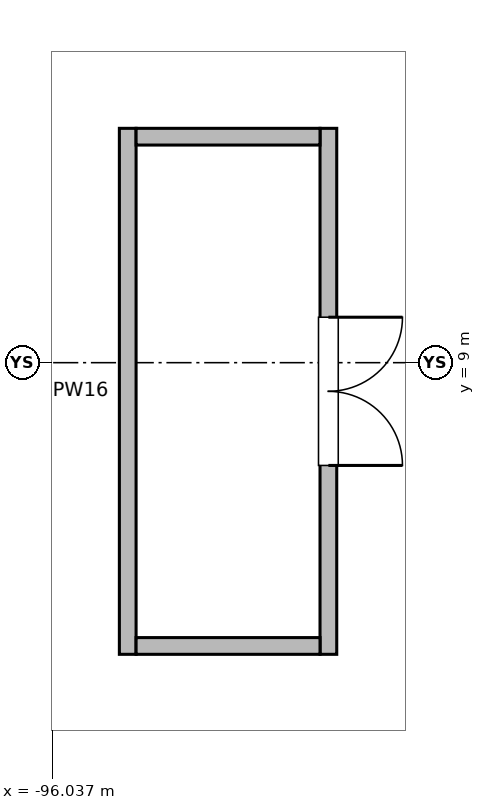
"""IFC4 building model, lengths in metres.
Left out: names, types, materials, properties, quantities, classifications, styles, units other than length and angle.
Written with IfcOpenShell. Run it as: python <this file> out.ifc"""

import sys

from ifc_helpers import new_model, si_unit, direction, frame, frame_2d, origin, place, context, subcontext, project, spatial, rectangle, extrude, element, fill, save


model = new_model("IFC4")
c1 = context("Model", 3, precision=1e-05, world=origin(), true_north=direction((0.0, 1.0)))
c2 = subcontext(c1, "Body", "Model", "MODEL_VIEW")
j1 = project(units=[si_unit("LENGTHUNIT", "METRE"), si_unit("PLANEANGLEUNIT", "RADIAN")], contexts=[c1])
p1 = place(None, origin())
s1 = spatial("IfcSite", under=j1, at=p1, CompositionType="ELEMENT")
p2 = place(p1, origin())
s2 = spatial("IfcBuilding", under=s1, at=p2, CompositionType="ELEMENT")
p3 = place(p2, frame((0.0, 0.0, -6.0)))
s3 = spatial("IfcBuildingStorey", under=s2, at=p3, CompositionType="ELEMENT", Elevation=-6.0)
p4 = place(p3, frame((-92.401, 12.083, 0.0), z_axis=(0.0, 0.0, 1.0), x_axis=(0.0, -1.0, 0.0)))
e1 = element("IfcWall", 1, at=p4, inside=s3, PredefinedType="PARTITIONING", context=c2, shape_type="SweptSolid", body=[
    extrude(rectangle(XDim=6.92, YDim=0.22, at=frame_2d((3.46, 0.0))), origin(), (0.0, 0.0, 1.0), 5.02),
])
p5 = place(p4, frame((2.485, 0.0, 0.0)))
e2 = element("IfcOpeningElement", 2, at=p5, cuts=e1, PredefinedType="OPENING", context=c2, shape_type="SweptSolid", body=[
    extrude(rectangle(XDim=1.95, YDim=2.35, at=frame_2d((0.975, 1.175))), frame((0.0, 0.12, 0.0), z_axis=(0.0, -1.0, 0.0), x_axis=(1.0, 0.0, 0.0)), (0.0, 0.0, 1.0), 0.24),
])
p6 = place(p3, frame((-95.041, 5.163, 0.0), z_axis=(0.0, 0.0, 1.0), x_axis=(0.0, 1.0, 0.0)))
e3 = element("IfcWall", 3, at=p6, inside=s3, PredefinedType="PARTITIONING", context=c2, shape_type="SweptSolid", body=[
    extrude(rectangle(XDim=6.92, YDim=0.22, at=frame_2d((3.46, 0.0))), origin(), (0.0, 0.0, 1.0), 5.02),
])
for number, where, z_axis, x_axis in (
    (4, (-94.931, 5.273, 0.0), (0.0, 0.0, 1.0), (1.0, 0.0, 0.0)),
    (5, (-94.931, 11.973, 0.0), (0.0, 0.0, 1.0), (1.0, 0.0, 0.0)),
):
    element("IfcWall", number, at=place(p3, frame(where, z_axis=z_axis, x_axis=x_axis)), inside=s3, PredefinedType="PARTITIONING", context=c2, shape_type="SweptSolid", body=[
        extrude(rectangle(XDim=2.42, YDim=0.22, at=frame_2d((1.21, 0.0))), origin(), (0.0, 0.0, 1.0), 5.02),
    ])
p7 = place(p5, origin())
e6 = element("IfcDoor", 6, at=p7, inside=s3, OperationType="DOUBLE_DOOR_SINGLE_SWING", PredefinedType="DOOR", context=c2, shape_type="SweptSolid", body=[
    extrude(rectangle(XDim=1.95, YDim=2.35, at=frame_2d((0.975, 1.175))), frame((0.0, 0.025, 0.0), z_axis=(0.0, -1.0, 0.0), x_axis=(1.0, 0.0, 0.0)), (0.0, 0.0, 1.0), 0.05),
])
fill(e2, e6)
save(model, sys.argv[1])
